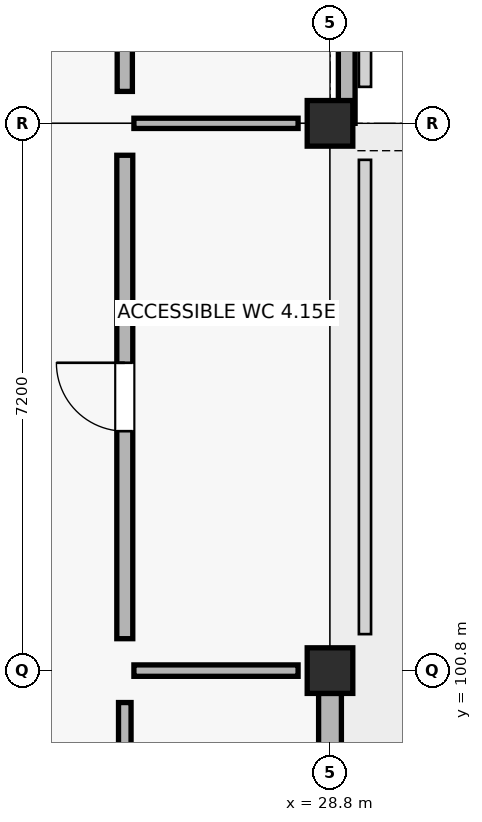
"""IFC4 building model, lengths in metres.
Left out: names, types, materials, properties, quantities, classifications, styles, units other than length and angle.
Written with IfcOpenShell. Run it as: python <this file> out.ifc"""

import sys

from ifc_helpers import new_model, si_unit, direction, frame, frame_2d, origin, origin_2d, place, context, subcontext, project, spatial, rectangle, extrude, element, fill, save


model = new_model("IFC4")
c1 = context("Model", 3, precision=1e-05, world=origin(), true_north=direction((0.0, 1.0)))
c2 = subcontext(c1, "Body", "Model", "MODEL_VIEW")
j1 = project(units=[si_unit("LENGTHUNIT", "METRE"), si_unit("PLANEANGLEUNIT", "RADIAN")], contexts=[c1])
p1 = place(None, origin())
s1 = spatial("IfcSite", under=j1, at=p1, CompositionType="ELEMENT")
p2 = place(p1, origin())
s2 = spatial("IfcBuilding", under=s1, at=p2, CompositionType="ELEMENT")
p3 = place(p2, frame((0.0, 0.0, 13.5)))
s3 = spatial("IfcBuildingStorey", under=s2, at=p3, CompositionType="ELEMENT", Elevation=13.5)
for number, where, z_axis, x_axis in (
    (1, (28.8, 100.8, 0.0), (0.0, 0.0, 1.0), (1.0, 0.0, 0.0)),
    (2, (28.8, 108.0, 0.0), (0.0, 0.0, 1.0), (1.0, 0.0, 0.0)),
):
    element("IfcColumn", number, at=place(p3, frame(where, z_axis=z_axis, x_axis=x_axis)), inside=s3, PredefinedType="COLUMN", context=c2, shape_type="SweptSolid", body=[
        extrude(rectangle(XDim=0.6, YDim=0.6, at=origin_2d()), origin(), (0.0, 0.0, 1.0), 4.05),
    ])
p4 = place(p3, frame((28.8, 93.825, 0.0), z_axis=(0.0, 0.0, 1.0), x_axis=(0.0, 1.0, 0.0)))
e3 = element("IfcWall", 3, at=p4, inside=s3, PredefinedType="STANDARD", context=c2, shape_type="SweptSolid", body=[
    extrude(rectangle(XDim=6.675, YDim=0.3, at=frame_2d((3.337, 0.0))), origin(), (0.0, 0.0, 1.0), 3.24),
])
p5 = place(p4, frame((2.788, 0.0, 0.0)))
e4 = element("IfcOpeningElement", 4, at=p5, cuts=e3, PredefinedType="OPENING", context=c2, shape_type="SweptSolid", body=[
    extrude(rectangle(XDim=1.1, YDim=2.15, at=frame_2d((0.55, 1.075))), frame((0.0, 0.16, 0.0), z_axis=(0.0, -1.0, 0.0), x_axis=(1.0, 0.0, 0.0)), (0.0, 0.0, 1.0), 0.32),
])
p6 = place(p3, frame((29.02, 108.0, 0.0), z_axis=(0.0, 0.0, 1.0), x_axis=(0.0, 1.0, 0.0)))
e5 = element("IfcWall", 5, at=p6, inside=s3, PredefinedType="PARAPET", context=c2, shape_type="SweptSolid", body=[
    extrude(rectangle(XDim=7.2, YDim=0.22, at=frame_2d((3.6, 0.0))), origin(), (0.0, 0.0, 1.0), 0.95),
])
p7 = place(p3, frame((26.1, 94.02, 0.0), z_axis=(0.0, 0.0, 1.0), x_axis=(0.0, 1.0, 0.0)))
e6 = element("IfcWall", 6, at=p7, inside=s3, PredefinedType="PARTITIONING", context=c2, shape_type="SweptSolid", body=[
    extrude(rectangle(XDim=6.36, YDim=0.165, at=frame_2d((3.18, 0.0))), origin(), (0.0, 0.0, 1.0), 2.93),
])
p8 = place(p7, frame((2.53, 0.0, 0.0)))
e7 = element("IfcOpeningElement", 7, at=p8, cuts=e6, PredefinedType="OPENING", context=c2, shape_type="SweptSolid", body=[
    extrude(rectangle(XDim=1.3, YDim=2.15, at=frame_2d((0.65, 1.075))), frame((0.0, 0.093, 0.0), z_axis=(0.0, -1.0, 0.0), x_axis=(1.0, 0.0, 0.0)), (0.0, 0.0, 1.0), 0.185),
])
p9 = place(p3, frame((26.22, 100.8, 0.0), z_axis=(0.0, 0.0, 1.0), x_axis=(1.0, 0.0, 0.0)))
e8 = element("IfcWall", 8, at=p9, inside=s3, PredefinedType="PARTITIONING", context=c2, shape_type="SweptSolid", body=[
    extrude(rectangle(XDim=2.16, YDim=0.15, at=frame_2d((1.08, 0.0))), origin(), (0.0, 0.0, 1.0), 2.93),
])
p10 = place(p3, frame((26.1, 101.22, 0.0), z_axis=(0.0, 0.0, 1.0), x_axis=(0.0, 1.0, 0.0)))
e9 = element("IfcWall", 9, at=p10, inside=s3, PredefinedType="PLUMBINGWALL", context=c2, shape_type="SweptSolid", body=[
    extrude(rectangle(XDim=6.36, YDim=0.21, at=frame_2d((3.18, 0.0))), origin(), (0.0, 0.0, 1.0), 2.93),
])
p11 = place(p10, frame((2.73, 0.0, 0.0)))
e10 = element("IfcOpeningElement", 10, at=p11, cuts=e9, PredefinedType="OPENING", context=c2, shape_type="SweptSolid", body=[
    extrude(rectangle(XDim=0.9, YDim=2.04, at=frame_2d((0.45, 1.02))), frame((0.0, 0.115, 0.0), z_axis=(0.0, -1.0, 0.0), x_axis=(1.0, 0.0, 0.0)), (0.0, 0.0, 1.0), 0.23),
])
p12 = place(p3, frame((26.22, 108.0, 0.0), z_axis=(0.0, 0.0, 1.0), x_axis=(1.0, 0.0, 0.0)))
e11 = element("IfcWall", 11, at=p12, inside=s3, PredefinedType="PARTITIONING", context=c2, shape_type="SweptSolid", body=[
    extrude(rectangle(XDim=2.16, YDim=0.135, at=frame_2d((1.08, 0.0))), origin(), (0.0, 0.0, 1.0), 2.93),
])
p13 = place(p3, frame((26.1, 108.42, 0.0), z_axis=(0.0, 0.0, 1.0), x_axis=(0.0, 1.0, 0.0)))
e12 = element("IfcWall", 12, at=p13, inside=s3, PredefinedType="SOLIDWALL", context=c2, shape_type="SweptSolid", body=[
    extrude(rectangle(XDim=6.36, YDim=0.2, at=frame_2d((3.18, 0.0))), origin(), (0.0, 0.0, 1.0), 2.93),
])
p14 = place(p13, frame((2.69, 0.0, 0.0)))
e13 = element("IfcOpeningElement", 13, at=p14, cuts=e12, PredefinedType="OPENING", context=c2, shape_type="SweptSolid", body=[
    extrude(rectangle(XDim=0.98, YDim=2.04, at=frame_2d((0.49, 1.02))), frame((0.0, 0.11, 0.0), z_axis=(0.0, -1.0, 0.0), x_axis=(1.0, 0.0, 0.0)), (0.0, 0.0, 1.0), 0.22),
])
p15 = place(p11, origin())
e14 = element("IfcDoor", 14, at=p15, inside=s3, OperationType="SINGLE_SWING_RIGHT", PredefinedType="DOOR", context=c2, shape_type="SweptSolid", body=[
    extrude(rectangle(XDim=0.9, YDim=2.04, at=frame_2d((0.45, 1.02))), frame((0.0, 0.025, 0.0), z_axis=(0.0, -1.0, 0.0), x_axis=(1.0, 0.0, 0.0)), (0.0, 0.0, 1.0), 0.05),
])
fill(e10, e14)
save(model, sys.argv[1])
